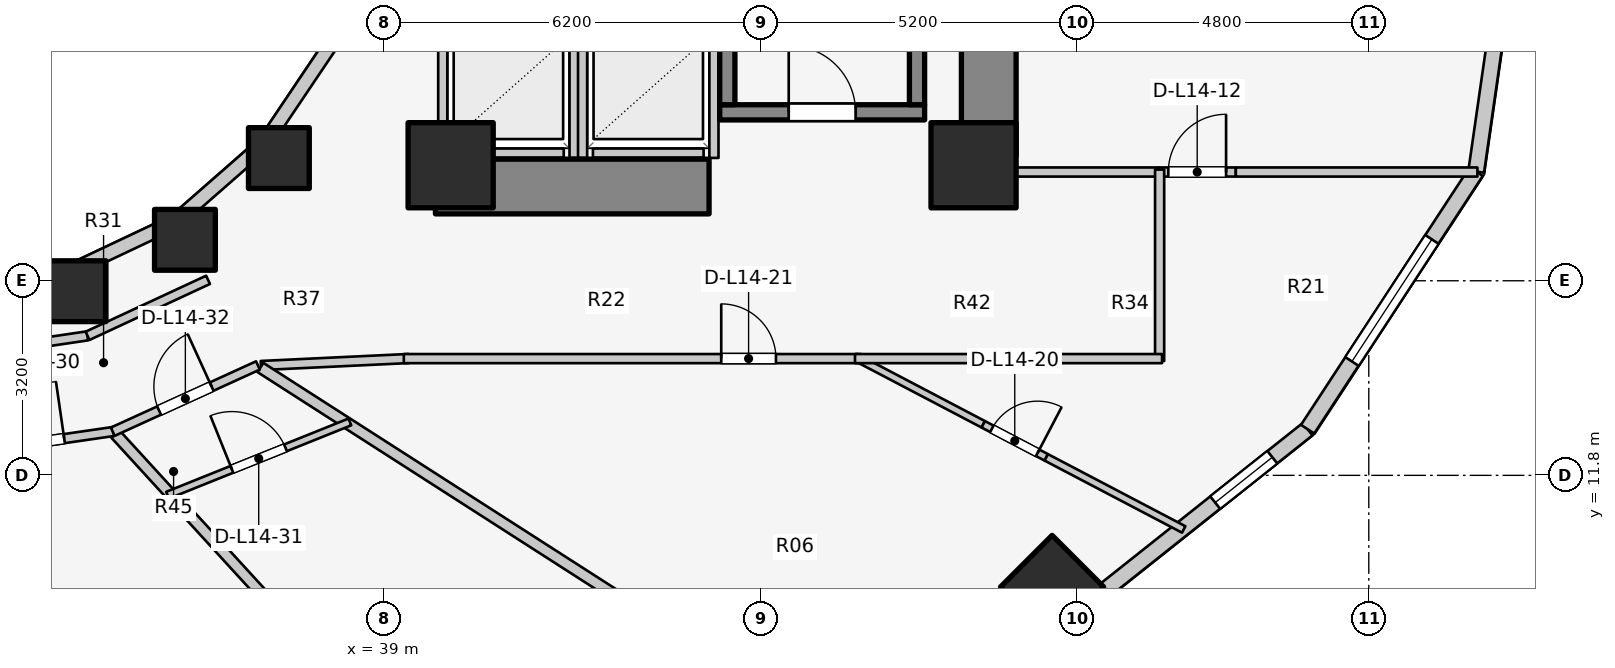
"""IFC4 building model, lengths in metres.
Left out: names, types, materials, properties, quantities, classifications, styles, units other than length and angle.
Written with IfcOpenShell. Run it as: python <this file> out.ifc"""

import sys

from ifc_helpers import new_model, si_unit, direction, frame, frame_2d, origin, origin_2d, place, context, subcontext, project, spatial, rectangle, extrude, element, fill, save


model = new_model("IFC4")
c1 = context("Model", 3, precision=1e-05, world=origin(), true_north=direction((0.0, 1.0)))
c2 = subcontext(c1, "Body", "Model", "MODEL_VIEW")
j1 = project(units=[si_unit("LENGTHUNIT", "METRE"), si_unit("PLANEANGLEUNIT", "RADIAN")], contexts=[c1])
p1 = place(None, origin())
s1 = spatial("IfcSite", under=j1, at=p1, CompositionType="ELEMENT")
p2 = place(p1, origin())
s2 = spatial("IfcBuilding", under=s1, at=p2, CompositionType="ELEMENT")
p3 = place(p2, frame((0.0, 0.0, 49.3)))
s3 = spatial("IfcBuildingStorey", under=s2, at=p3, CompositionType="ELEMENT", Elevation=49.3)
p4 = place(p3, frame((48.95, 17.05, 0.0), z_axis=(0.0, 0.0, 1.0), x_axis=(0.0, 1.0, 0.0)))
e1 = element("IfcWall", 1, at=p4, inside=s3, PredefinedType="SHEAR", context=c2, shape_type="SweptSolid", body=[
    extrude(rectangle(XDim=12.8, YDim=0.9, at=frame_2d((6.4, 0.0))), origin(), (0.0, 0.0, 1.0), 3.1),
])
p5 = place(p3, frame((39.85, 16.55, 0.0), z_axis=(0.0, 0.0, 1.0), x_axis=(1.0, 0.0, 0.0)))
e2 = element("IfcWall", 2, at=p5, inside=s3, PredefinedType="SHEAR", context=c2, shape_type="SweptSolid", body=[
    extrude(rectangle(XDim=4.5, YDim=0.9, at=frame_2d((2.25, 0.0))), origin(), (0.0, 0.0, 1.0), 3.1),
])
p6 = place(p3, frame((44.525, 17.77, 0.0), z_axis=(0.0, 0.0, 1.0), x_axis=(1.0, 0.0, 0.0)))
e3 = element("IfcWall", 3, at=p6, inside=s3, PredefinedType="SOLIDWALL", context=c2, shape_type="SweptSolid", body=[
    extrude(rectangle(XDim=3.37, YDim=0.25, at=frame_2d((1.685, 0.0))), origin(), (0.0, 0.0, 1.0), 3.1),
])
p7 = place(p6, frame((1.135, 0.0, 0.0)))
e4 = element("IfcOpeningElement", 4, at=p7, cuts=e3, PredefinedType="OPENING", context=c2, shape_type="SweptSolid", body=[
    extrude(rectangle(XDim=1.1, YDim=2.1, at=frame_2d((0.55, 1.05))), frame((0.0, 0.135, 0.0), z_axis=(0.0, -1.0, 0.0), x_axis=(1.0, 0.0, 0.0)), (0.0, 0.0, 1.0), 0.27),
])
for number, where, z_axis, x_axis in (
    (5, (44.65, 17.895, 0.0), (0.0, 0.0, 1.0), (0.0, 1.0, 0.0)),
    (6, (47.77, 17.895, 0.0), (0.0, 0.0, 1.0), (0.0, 1.0, 0.0)),
):
    element("IfcWall", number, at=place(p3, frame(where, z_axis=z_axis, x_axis=x_axis)), inside=s3, PredefinedType="SOLIDWALL", context=c2, shape_type="SweptSolid", body=[
        extrude(rectangle(XDim=7.81, YDim=0.25, at=frame_2d((3.905, 0.0))), origin(), (0.0, 0.0, 1.0), 3.1),
    ])
for number, where, z_axis, x_axis in (
    (7, (40.1, 16.9, 0.0), (0.0, 0.0, 1.0), (1.0, 0.0, 0.0)),
    (8, (48.7, 16.9, 0.0), (0.0, 0.0, 1.0), (1.0, 0.0, 0.0)),
):
    element("IfcColumn", number, at=place(p3, frame(where, z_axis=z_axis, x_axis=x_axis)), inside=s3, PredefinedType="COLUMN", context=c2, shape_type="SweptSolid", body=[
        extrude(rectangle(XDim=1.4, YDim=1.4, at=origin_2d()), origin(), (0.0, 0.0, 1.0), 3.1),
    ])
for number, where, z_axis, x_axis in (
    (9, (33.931, 14.828, 0.0), (0.0, 0.0, 1.0), (1.0, 0.0, 0.0)),
    (10, (35.73, 15.673, 0.0), (0.0, 0.0, 1.0), (1.0, 0.0, 0.0)),
    (11, (37.275, 17.018, 0.0), (0.0, 0.0, 1.0), (1.0, 0.0, 0.0)),
):
    element("IfcColumn", number, at=place(p3, frame(where, z_axis=z_axis, x_axis=x_axis)), inside=s3, PredefinedType="COLUMN", context=c2, shape_type="SweptSolid", body=[
        extrude(rectangle(XDim=1.0, YDim=1.0, at=origin_2d()), origin(), (0.0, 0.0, 1.0), 3.1),
    ])
p8 = place(p3, frame((49.992, 9.965, 0.0), z_axis=(0.0, 0.0, 1.0), x_axis=(0.707106781187, -0.707106781187, 0.0)))
e12 = element("IfcColumn", 12, at=p8, inside=s3, PredefinedType="COLUMN", context=c2, shape_type="SweptSolid", body=[
    extrude(rectangle(XDim=1.2, YDim=1.2, at=origin_2d()), origin(), (0.0, 0.0, 1.0), 3.1),
])
p9 = place(p3, frame((32.0, 14.88, 0.0), z_axis=(0.0, 0.0, 1.0), x_axis=(0.988901730308, 0.148571086668, 0.0)))
e13 = element("IfcWall", 13, at=p9, inside=s3, PredefinedType="STANDARD", context=c2, shape_type="SweptSolid", body=[
    extrude(rectangle(XDim=1.864, YDim=0.23, at=frame_2d((0.932, 0.0))), origin(), (0.0, 0.0, 1.0), 2.16),
])
p10 = place(p3, frame((33.843, 15.157, 0.0), z_axis=(0.0, 0.0, 1.0), x_axis=(0.904179699603, 0.427152280606, 0.0)))
e14 = element("IfcWall", 14, at=p10, inside=s3, PredefinedType="STANDARD", context=c2, shape_type="SweptSolid", body=[
    extrude(rectangle(XDim=1.899, YDim=0.23, at=frame_2d((0.95, 0.0))), origin(), (0.0, 0.0, 1.0), 2.16),
])
p11 = place(p3, frame((35.56, 15.968, 0.0), z_axis=(0.0, 0.0, 1.0), x_axis=(0.752576694707, 0.658504607869, 0.0)))
e15 = element("IfcWall", 15, at=p11, inside=s3, PredefinedType="STANDARD", context=c2, shape_type="SweptSolid", body=[
    extrude(rectangle(XDim=1.959, YDim=0.23, at=frame_2d((0.98, 0.0))), origin(), (0.0, 0.0, 1.0), 2.16),
])
p12 = place(p3, frame((37.035, 17.258, 0.0), z_axis=(0.0, 0.0, 1.0), x_axis=(0.558197800898, 0.829707909492, 0.0)))
e16 = element("IfcWall", 16, at=p12, inside=s3, PredefinedType="STANDARD", context=c2, shape_type="SweptSolid", body=[
    extrude(rectangle(XDim=2.027, YDim=0.23, at=frame_2d((1.013, 0.0))), origin(), (0.0, 0.0, 1.0), 2.16),
])
p13 = place(p3, frame((50.405, 9.55, 0.0), z_axis=(0.0, 0.0, 1.0), x_axis=(0.783123133379, 0.621866672179, 0.0)))
e17 = element("IfcWall", 17, at=p13, inside=s3, PredefinedType="STANDARD", context=c2, shape_type="SweptSolid", body=[
    extrude(rectangle(XDim=4.839, YDim=0.26, at=frame_2d((2.419, 0.0))), origin(), (0.0, 0.0, 1.0), 2.85),
])
p14 = place(p13, frame((2.898, 0.0, 0.75)))
e18 = element("IfcOpeningElement", 18, at=p14, cuts=e17, PredefinedType="OPENING", context=c2, shape_type="SweptSolid", body=[
    extrude(rectangle(XDim=1.2, YDim=1.5, at=frame_2d((0.6, 0.75))), frame((0.0, 0.14, 0.0), z_axis=(0.0, -1.0, 0.0), x_axis=(1.0, 0.0, 0.0)), (0.0, 0.0, 1.0), 0.28),
])
p15 = place(p3, frame((54.194, 12.559, 0.0), z_axis=(0.0, 0.0, 1.0), x_axis=(0.547702757047, 0.836672988642, 0.0)))
e19 = element("IfcWall", 19, at=p15, inside=s3, PredefinedType="STANDARD", context=c2, shape_type="SweptSolid", body=[
    extrude(rectangle(XDim=5.062, YDim=0.26, at=frame_2d((2.531, 0.0))), origin(), (0.0, 0.0, 1.0), 2.85),
])
p16 = place(p15, frame((1.331, 0.0, 0.75)))
e20 = element("IfcOpeningElement", 20, at=p16, cuts=e19, PredefinedType="OPENING", context=c2, shape_type="SweptSolid", body=[
    extrude(rectangle(XDim=2.4, YDim=1.7, at=frame_2d((1.2, 0.85))), frame((0.0, 0.14, 0.0), z_axis=(0.0, -1.0, 0.0), x_axis=(1.0, 0.0, 0.0)), (0.0, 0.0, 1.0), 0.28),
])
p17 = place(p3, frame((56.967, 16.795, 0.0), z_axis=(0.0, 0.0, 1.0), x_axis=(0.142528001686, 0.989790770181, 0.0)))
e21 = element("IfcWall", 21, at=p17, inside=s3, PredefinedType="STANDARD", context=c2, shape_type="SweptSolid", body=[
    extrude(rectangle(XDim=6.269, YDim=0.26, at=frame_2d((3.135, 0.0))), origin(), (0.0, 0.0, 1.0), 2.85),
])
p18 = place(p17, frame((2.385, 0.0, 0.75)))
e22 = element("IfcOpeningElement", 22, at=p18, cuts=e21, PredefinedType="OPENING", context=c2, shape_type="SweptSolid", body=[
    extrude(rectangle(XDim=1.5, YDim=1.6, at=frame_2d((0.75, 0.8))), frame((0.0, 0.14, 0.0), z_axis=(0.0, -1.0, 0.0), x_axis=(1.0, 0.0, 0.0)), (0.0, 0.0, 1.0), 0.28),
])
p19 = place(p3, frame((40.14, 17.1, 0.0), z_axis=(0.0, 0.0, 1.0), x_axis=(1.0, 0.0, 0.0)))
e23 = element("IfcWall", 23, at=p19, inside=s3, PredefinedType="SOLIDWALL", context=c2, shape_type="SweptSolid", body=[
    extrude(rectangle(XDim=1.82, YDim=0.15, at=frame_2d((0.91, 0.0))), origin(), (0.0, 0.0, 1.0), 2.12),
])
p20 = place(p3, frame((39.97, 17.02, 0.0), z_axis=(0.0, 0.0, 1.0), x_axis=(0.0, 1.0, 0.0)))
e24 = element("IfcWall", 24, at=p20, inside=s3, PredefinedType="SOLIDWALL", context=c2, shape_type="SweptSolid", body=[
    extrude(rectangle(XDim=2.22, YDim=0.15, at=frame_2d((1.11, 0.0))), origin(), (0.0, 0.0, 1.0), 2.12),
])
p21 = place(p3, frame((42.13, 17.02, 0.0), z_axis=(0.0, 0.0, 1.0), x_axis=(0.0, 1.0, 0.0)))
e25 = element("IfcWall", 25, at=p21, inside=s3, PredefinedType="SOLIDWALL", context=c2, shape_type="SweptSolid", body=[
    extrude(rectangle(XDim=2.22, YDim=0.15, at=frame_2d((1.11, 0.0))), origin(), (0.0, 0.0, 1.0), 2.855),
])
p22 = place(p3, frame((42.44, 17.1, 0.0), z_axis=(0.0, 0.0, 1.0), x_axis=(1.0, 0.0, 0.0)))
e26 = element("IfcWall", 26, at=p22, inside=s3, PredefinedType="SOLIDWALL", context=c2, shape_type="SweptSolid", body=[
    extrude(rectangle(XDim=1.82, YDim=0.15, at=frame_2d((0.91, 0.0))), origin(), (0.0, 0.0, 1.0), 2.855),
])
p23 = place(p3, frame((42.27, 17.02, 0.0), z_axis=(0.0, 0.0, 1.0), x_axis=(0.0, 1.0, 0.0)))
e27 = element("IfcWall", 27, at=p23, inside=s3, PredefinedType="SOLIDWALL", context=c2, shape_type="SweptSolid", body=[
    extrude(rectangle(XDim=2.22, YDim=0.15, at=frame_2d((1.11, 0.0))), origin(), (0.0, 0.0, 1.0), 2.855),
])
p24 = place(p3, frame((44.43, 17.02, 0.0), z_axis=(0.0, 0.0, 1.0), x_axis=(0.0, 1.0, 0.0)))
e28 = element("IfcWall", 28, at=p24, inside=s3, PredefinedType="SOLIDWALL", context=c2, shape_type="SweptSolid", body=[
    extrude(rectangle(XDim=2.22, YDim=0.15, at=frame_2d((1.11, 0.0))), origin(), (0.0, 0.0, 1.0), 2.12),
])
p25 = place(p3, frame((32.0, 13.78, 0.0), z_axis=(0.0, 0.0, 1.0), x_axis=(0.989268584896, 0.146108408166, 0.0)))
e29 = element("IfcWall", 29, at=p25, inside=s3, PredefinedType="PARTITIONING", context=c2, shape_type="SweptSolid", body=[
    extrude(rectangle(XDim=2.151, YDim=0.15, at=frame_2d((1.075, 0.0))), origin(), (0.0, 0.0, 1.0), 2.237),
])
p26 = place(p3, frame((34.127, 14.094, 0.0), z_axis=(0.0, 0.0, 1.0), x_axis=(0.906943449489, 0.421252393975, 0.0)))
e30 = element("IfcWall", 30, at=p26, inside=s3, PredefinedType="PARTITIONING", context=c2, shape_type="SweptSolid", body=[
    extrude(rectangle(XDim=2.186, YDim=0.15, at=frame_2d((1.093, 0.0))), origin(), (0.0, 0.0, 1.0), 2.237),
])
p27 = place(p3, frame((48.95, 16.788, 0.0), z_axis=(0.0, 0.0, 1.0), x_axis=(1.0, 0.0, 0.0)))
e31 = element("IfcWall", 31, at=p27, inside=s3, PredefinedType="PARTITIONING", context=c2, shape_type="SweptSolid", body=[
    extrude(rectangle(XDim=2.793, YDim=0.15, at=frame_2d((1.396, 0.0))), origin(), (0.0, 0.0, 1.0), 2.069),
])
p28 = place(p3, frame((51.743, 16.788, 0.0), z_axis=(0.0, 0.0, 1.0), x_axis=(1.0, 0.0, 0.0)))
e32 = element("IfcWall", 32, at=p28, inside=s3, PredefinedType="PARTITIONING", context=c2, shape_type="SweptSolid", body=[
    extrude(rectangle(XDim=1.27, YDim=0.15, at=frame_2d((0.635, 0.0))), origin(), (0.0, 0.0, 1.0), 2.855),
])
p29 = place(p28, frame((0.16, 0.0, 0.0)))
e33 = element("IfcOpeningElement", 33, at=p29, cuts=e32, PredefinedType="OPENING", context=c2, shape_type="SweptSolid", body=[
    extrude(rectangle(XDim=0.95, YDim=2.1, at=frame_2d((0.475, 1.05))), frame((0.0, 0.085, 0.0), z_axis=(0.0, -1.0, 0.0), x_axis=(1.0, 0.0, 0.0)), (0.0, 0.0, 1.0), 0.17),
])
p30 = place(p3, frame((53.013, 16.788, 0.0), z_axis=(0.0, 0.0, 1.0), x_axis=(1.0, 0.0, 0.0)))
e34 = element("IfcWall", 34, at=p30, inside=s3, PredefinedType="PARTITIONING", context=c2, shape_type="SweptSolid", body=[
    extrude(rectangle(XDim=3.973, YDim=0.15, at=frame_2d((1.987, 0.0))), origin(), (0.0, 0.0, 1.0), 2.855),
])
p31 = place(p3, frame((51.76, 13.68, 0.0), z_axis=(0.0, 0.0, 1.0), x_axis=(0.0, 1.0, 0.0)))
e35 = element("IfcWall", 35, at=p31, inside=s3, PredefinedType="PARTITIONING", context=c2, shape_type="SweptSolid", body=[
    extrude(rectangle(XDim=3.148, YDim=0.15, at=frame_2d((1.574, 0.0))), origin(), (0.0, 0.0, 1.0), 2.855),
])
p32 = place(p3, frame((46.756, 13.743, 0.0), z_axis=(0.0, 0.0, 1.0), x_axis=(0.885586030676, -0.464475383924, 0.0)))
e36 = element("IfcWall", 36, at=p32, inside=s3, PredefinedType="MOVABLE", context=c2, shape_type="SweptSolid", body=[
    extrude(rectangle(XDim=2.376, YDim=0.12, at=frame_2d((1.188, 0.0))), origin(), (0.0, 0.0, 1.0), 2.855),
])
p33 = place(p3, frame((48.86, 12.64, 0.0), z_axis=(0.0, 0.0, 1.0), x_axis=(0.885447282698, -0.464739829972, 0.0)))
e37 = element("IfcWall", 37, at=p33, inside=s3, PredefinedType="MOVABLE", context=c2, shape_type="SweptSolid", body=[
    extrude(rectangle(XDim=1.17, YDim=0.12, at=frame_2d((0.585, 0.0))), origin(), (0.0, 0.0, 1.0), 2.11),
])
p34 = place(p33, frame((0.16, 0.0, 0.0)))
e38 = element("IfcOpeningElement", 38, at=p34, cuts=e37, PredefinedType="OPENING", context=c2, shape_type="SweptSolid", body=[
    extrude(rectangle(XDim=0.85, YDim=2.05, at=frame_2d((0.425, 1.025))), frame((0.0, 0.07, 0.0), z_axis=(0.0, -1.0, 0.0), x_axis=(1.0, 0.0, 0.0)), (0.0, 0.0, 1.0), 0.14),
])
p35 = place(p3, frame((49.896, 12.096, 0.0), z_axis=(0.0, 0.0, 1.0), x_axis=(0.885573027611, -0.464500175208, 0.0)))
e39 = element("IfcWall", 39, at=p35, inside=s3, PredefinedType="MOVABLE", context=c2, shape_type="SweptSolid", body=[
    extrude(rectangle(XDim=2.552, YDim=0.12, at=frame_2d((1.276, 0.0))), origin(), (0.0, 0.0, 1.0), 2.069),
])
p36 = place(p3, frame((36.98, 13.606, 0.0), z_axis=(0.0, 0.0, 1.0), x_axis=(0.998877427952, 0.047369651964, 0.0)))
e40 = element("IfcWall", 40, at=p36, inside=s3, PredefinedType="PARTITIONING", context=c2, shape_type="SweptSolid", body=[
    extrude(rectangle(XDim=2.433, YDim=0.15, at=frame_2d((1.216, 0.0))), origin(), (0.0, 0.0, 1.0), 2.237),
])
p37 = place(p3, frame((39.33, 13.72, 0.0), z_axis=(0.0, 0.0, 1.0), x_axis=(1.0, 0.0, 0.0)))
e41 = element("IfcWall", 41, at=p37, inside=s3, PredefinedType="PARTITIONING", context=c2, shape_type="SweptSolid", body=[
    extrude(rectangle(XDim=7.52, YDim=0.15, at=frame_2d((3.76, 0.0))), origin(), (0.0, 0.0, 1.0), 2.237),
])
p38 = place(p37, frame((5.22, 0.0, 0.0)))
e42 = element("IfcOpeningElement", 42, at=p38, cuts=e41, PredefinedType="OPENING", context=c2, shape_type="SweptSolid", body=[
    extrude(rectangle(XDim=0.9, YDim=2.1, at=frame_2d((0.45, 1.05))), frame((0.0, 0.085, 0.0), z_axis=(0.0, -1.0, 0.0), x_axis=(1.0, 0.0, 0.0)), (0.0, 0.0, 1.0), 0.17),
])
p39 = place(p3, frame((46.75, 13.72, 0.0), z_axis=(0.0, 0.0, 1.0), x_axis=(1.0, 0.0, 0.0)))
e43 = element("IfcWall", 43, at=p39, inside=s3, PredefinedType="PARTITIONING", context=c2, shape_type="SweptSolid", body=[
    extrude(rectangle(XDim=5.05, YDim=0.15, at=frame_2d((2.525, 0.0))), origin(), (0.0, 0.0, 1.0), 2.069),
])
p40 = place(p3, frame((34.586, 12.479, 0.0), z_axis=(0.0, 0.0, 1.0), x_axis=(0.675465011224, -0.737392038615, 0.0)))
e44 = element("IfcWall", 44, at=p40, inside=s3, PredefinedType="PARTITIONING", context=c2, shape_type="SweptSolid", body=[
    extrude(rectangle(XDim=8.007, YDim=0.18, at=frame_2d((4.003, 0.0))), origin(), (0.0, 0.0, 1.0), 2.237),
])
p41 = place(p3, frame((36.971, 13.574, 0.0), z_axis=(0.0, 0.0, 1.0), x_axis=(0.841689919529, -0.5399611832, 0.0)))
e45 = element("IfcWall", 45, at=p41, inside=s3, PredefinedType="PARTITIONING", context=c2, shape_type="SweptSolid", body=[
    extrude(rectangle(XDim=10.058, YDim=0.18, at=frame_2d((5.029, 0.0))), origin(), (0.0, 0.0, 1.0), 2.237),
])
p42 = place(p3, frame((31.993, 12.15, 0.0), z_axis=(0.0, 0.0, 1.0), x_axis=(0.989637894688, 0.143585644814, 0.0)))
e46 = element("IfcWall", 46, at=p42, inside=s3, PredefinedType="PARTITIONING", context=c2, shape_type="SweptSolid", body=[
    extrude(rectangle(XDim=2.59, YDim=0.15, at=frame_2d((1.295, 0.0))), origin(), (0.0, 0.0, 1.0), 2.237),
])
p43 = place(p42, frame((0.82, 0.0, 0.0)))
e47 = element("IfcOpeningElement", 47, at=p43, cuts=e46, PredefinedType="OPENING", context=c2, shape_type="SweptSolid", body=[
    extrude(rectangle(XDim=0.95, YDim=2.1, at=frame_2d((0.475, 1.05))), frame((0.0, 0.085, 0.0), z_axis=(0.0, -1.0, 0.0), x_axis=(1.0, 0.0, 0.0)), (0.0, 0.0, 1.0), 0.17),
])
p44 = place(p3, frame((35.444, 11.474, 0.0), z_axis=(0.0, 0.0, 1.0), x_axis=(0.927886718772, 0.372862222713, 0.0)))
e48 = element("IfcWall", 48, at=p44, inside=s3, PredefinedType="MOVABLE", context=c2, shape_type="SweptSolid", body=[
    extrude(rectangle(XDim=3.231, YDim=0.12, at=frame_2d((1.616, 0.0))), origin(), (0.0, 0.0, 1.0), 2.237),
])
p45 = place(p44, frame((1.141, 0.0, 0.0)))
e49 = element("IfcOpeningElement", 49, at=p45, cuts=e48, PredefinedType="OPENING", context=c2, shape_type="SweptSolid", body=[
    extrude(rectangle(XDim=0.95, YDim=2.1, at=frame_2d((0.475, 1.05))), frame((0.0, 0.07, 0.0), z_axis=(0.0, -1.0, 0.0), x_axis=(1.0, 0.0, 0.0)), (0.0, 0.0, 1.0), 0.14),
])
p46 = place(p3, frame((34.543, 12.518, 0.0), z_axis=(0.0, 0.0, 1.0), x_axis=(0.909747571199, 0.415161843982, 0.0)))
e50 = element("IfcWall", 50, at=p46, inside=s3, PredefinedType="PARTITIONING", context=c2, shape_type="SweptSolid", body=[
    extrude(rectangle(XDim=2.625, YDim=0.15, at=frame_2d((1.312, 0.0))), origin(), (0.0, 0.0, 1.0), 2.237),
])
p47 = place(p46, frame((0.838, 0.0, 0.0)))
e51 = element("IfcOpeningElement", 51, at=p47, cuts=e50, PredefinedType="OPENING", context=c2, shape_type="SweptSolid", body=[
    extrude(rectangle(XDim=0.95, YDim=2.1, at=frame_2d((0.475, 1.05))), frame((0.0, 0.085, 0.0), z_axis=(0.0, -1.0, 0.0), x_axis=(1.0, 0.0, 0.0)), (0.0, 0.0, 1.0), 0.17),
])
p48 = place(p14, origin())
e52 = element("IfcWindow", 52, at=p48, inside=s3, PartitioningType="SINGLE_PANEL", PredefinedType="WINDOW", context=c2, shape_type="SweptSolid", body=[
    extrude(rectangle(XDim=1.2, YDim=1.5, at=frame_2d((0.6, 0.75))), frame((0.0, 0.03, 0.0), z_axis=(0.0, -1.0, 0.0), x_axis=(1.0, 0.0, 0.0)), (0.0, 0.0, 1.0), 0.06),
])
fill(e18, e52)
p49 = place(p16, origin())
e53 = element("IfcWindow", 53, at=p49, inside=s3, PartitioningType="SINGLE_PANEL", PredefinedType="WINDOW", context=c2, shape_type="SweptSolid", body=[
    extrude(rectangle(XDim=2.4, YDim=1.7, at=frame_2d((1.2, 0.85))), frame((0.0, 0.03, 0.0), z_axis=(0.0, -1.0, 0.0), x_axis=(1.0, 0.0, 0.0)), (0.0, 0.0, 1.0), 0.06),
])
fill(e20, e53)
p50 = place(p7, origin())
e54 = element("IfcDoor", 54, at=p50, inside=s3, OperationType="SINGLE_SWING_LEFT", PredefinedType="DOOR", context=c2, shape_type="SweptSolid", body=[
    extrude(rectangle(XDim=1.1, YDim=2.1, at=frame_2d((0.55, 1.05))), frame((0.0, 0.025, 0.0), z_axis=(0.0, -1.0, 0.0), x_axis=(1.0, 0.0, 0.0)), (0.0, 0.0, 1.0), 0.05),
])
fill(e4, e54)
p51 = place(p29, origin())
e55 = element("IfcDoor", 55, at=p51, inside=s3, OperationType="SINGLE_SWING_RIGHT", PredefinedType="DOOR", context=c2, shape_type="SweptSolid", body=[
    extrude(rectangle(XDim=0.95, YDim=2.1, at=frame_2d((0.475, 1.05))), frame((0.0, 0.025, 0.0), z_axis=(0.0, -1.0, 0.0), x_axis=(1.0, 0.0, 0.0)), (0.0, 0.0, 1.0), 0.05),
])
fill(e33, e55)
p52 = place(p34, origin())
e56 = element("IfcDoor", 56, at=p52, inside=s3, OperationType="SINGLE_SWING_RIGHT", PredefinedType="DOOR", context=c2, shape_type="SweptSolid", body=[
    extrude(rectangle(XDim=0.85, YDim=2.05, at=frame_2d((0.425, 1.025))), frame((0.0, 0.025, 0.0), z_axis=(0.0, -1.0, 0.0), x_axis=(1.0, 0.0, 0.0)), (0.0, 0.0, 1.0), 0.05),
])
fill(e38, e56)
p53 = place(p38, origin())
e57 = element("IfcDoor", 57, at=p53, inside=s3, OperationType="SINGLE_SWING_LEFT", PredefinedType="DOOR", context=c2, shape_type="SweptSolid", body=[
    extrude(rectangle(XDim=0.9, YDim=2.1, at=frame_2d((0.45, 1.05))), frame((0.0, 0.025, 0.0), z_axis=(0.0, -1.0, 0.0), x_axis=(1.0, 0.0, 0.0)), (0.0, 0.0, 1.0), 0.05),
])
fill(e42, e57)
p54 = place(p43, origin())
e58 = element("IfcDoor", 58, at=p54, inside=s3, OperationType="SINGLE_SWING_RIGHT", PredefinedType="DOOR", context=c2, shape_type="SweptSolid", body=[
    extrude(rectangle(XDim=0.95, YDim=2.1, at=frame_2d((0.475, 1.05))), frame((0.0, 0.025, 0.0), z_axis=(0.0, -1.0, 0.0), x_axis=(1.0, 0.0, 0.0)), (0.0, 0.0, 1.0), 0.05),
])
fill(e47, e58)
p55 = place(p45, origin())
e59 = element("IfcDoor", 59, at=p55, inside=s3, OperationType="SINGLE_SWING_LEFT", PredefinedType="DOOR", context=c2, shape_type="SweptSolid", body=[
    extrude(rectangle(XDim=0.95, YDim=2.1, at=frame_2d((0.475, 1.05))), frame((0.0, 0.025, 0.0), z_axis=(0.0, -1.0, 0.0), x_axis=(1.0, 0.0, 0.0)), (0.0, 0.0, 1.0), 0.05),
])
fill(e49, e59)
p56 = place(p47, origin())
e60 = element("IfcDoor", 60, at=p56, inside=s3, OperationType="SINGLE_SWING_RIGHT", PredefinedType="DOOR", context=c2, shape_type="SweptSolid", body=[
    extrude(rectangle(XDim=0.95, YDim=2.1, at=frame_2d((0.475, 1.05))), frame((0.0, 0.025, 0.0), z_axis=(0.0, -1.0, 0.0), x_axis=(1.0, 0.0, 0.0)), (0.0, 0.0, 1.0), 0.05),
])
fill(e51, e60)
save(model, sys.argv[1])
